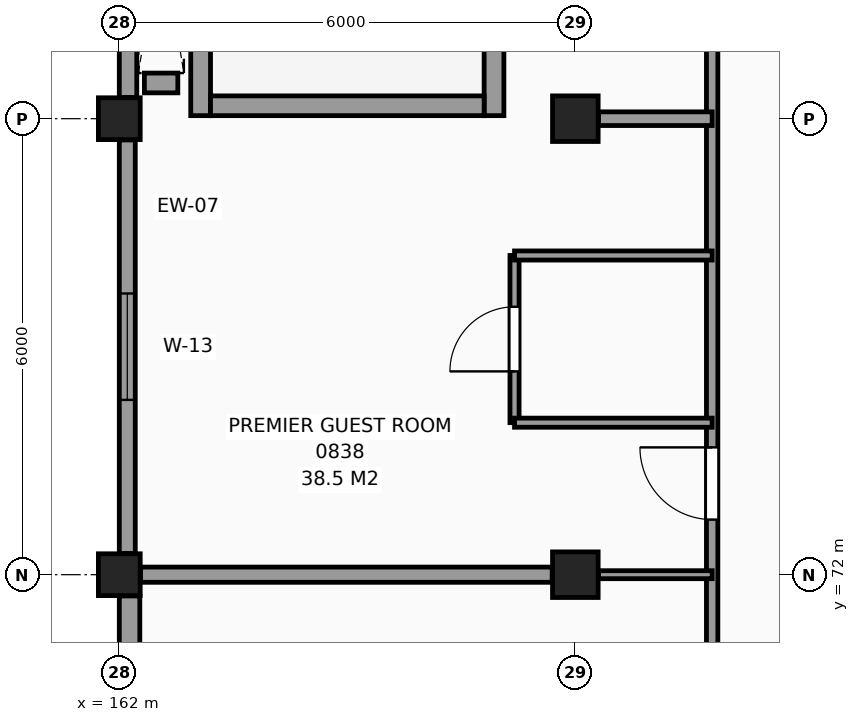
"""IFC4 building model, lengths in metres.
Left out: names, types, materials, properties, quantities, classifications, styles, units other than length and angle.
Written with IfcOpenShell. Run it as: python <this file> out.ifc"""

import sys

from ifc_helpers import new_model, si_unit, direction, frame, frame_2d, origin, origin_2d, place, context, subcontext, project, spatial, rectangle, extrude, element, fill, save


model = new_model("IFC4")
c1 = context("Model", 3, precision=1e-05, world=origin(), true_north=direction((0.0, 1.0)))
c2 = subcontext(c1, "Body", "Model", "MODEL_VIEW")
j1 = project(units=[si_unit("LENGTHUNIT", "METRE"), si_unit("PLANEANGLEUNIT", "RADIAN")], contexts=[c1])
p1 = place(None, origin())
s1 = spatial("IfcSite", under=j1, at=p1, CompositionType="ELEMENT")
p2 = place(p1, origin())
s2 = spatial("IfcBuilding", under=s1, at=p2, CompositionType="ELEMENT")
p3 = place(p2, frame((0.0, 0.0, 34.8)))
s3 = spatial("IfcBuildingStorey", under=s2, at=p3, CompositionType="ELEMENT", Elevation=34.8)
for number, where, z_axis, x_axis in (
    (1, (162.0, 72.0, 0.0), (0.0, 0.0, 1.0), (1.0, 0.0, 0.0)),
    (2, (162.0, 78.0, 0.0), (0.0, 0.0, 1.0), (1.0, 0.0, 0.0)),
):
    element("IfcColumn", number, at=place(p3, frame(where, z_axis=z_axis, x_axis=x_axis)), inside=s3, PredefinedType="COLUMN", context=c2, shape_type="SweptSolid", body=[
        extrude(rectangle(XDim=0.55, YDim=0.55, at=origin_2d()), origin(), (0.0, 0.0, 1.0), 3.3),
    ])
for number, where, z_axis, x_axis in (
    (3, (168.0, 72.0, 0.0), (0.0, 0.0, 1.0), (1.0, 0.0, 0.0)),
    (4, (168.0, 78.0, 0.0), (0.0, 0.0, 1.0), (1.0, 0.0, 0.0)),
):
    element("IfcColumn", number, at=place(p3, frame(where, z_axis=z_axis, x_axis=x_axis)), inside=s3, PredefinedType="COLUMN", context=c2, shape_type="SweptSolid", body=[
        extrude(rectangle(XDim=0.6, YDim=0.6, at=origin_2d()), origin(), (0.0, 0.0, 1.0), 3.3),
    ])
p4 = place(p3, frame((162.115, 83.72, 0.0), z_axis=(0.0, 0.0, 1.0), x_axis=(0.0, -1.0, 0.0)))
e5 = element("IfcWall", 5, at=p4, inside=s3, PredefinedType="SOLIDWALL", context=c2, shape_type="SweptSolid", body=[
    extrude(rectangle(XDim=5.44, YDim=0.23, at=frame_2d((2.72, 0.0))), origin(), (0.0, 0.0, 1.0), 3.07),
])
p5 = place(p3, frame((162.105, 77.72, 0.0), z_axis=(0.0, 0.0, 1.0), x_axis=(0.0, -1.0, 0.0)))
e6 = element("IfcWall", 6, at=p5, inside=s3, PredefinedType="SOLIDWALL", context=c2, shape_type="SweptSolid", body=[
    extrude(rectangle(XDim=5.44, YDim=0.21, at=frame_2d((2.72, 0.0))), origin(), (0.0, 0.0, 1.0), 2.42),
])
p6 = place(p5, frame((2.02, 0.0, 0.8)))
e7 = element("IfcOpeningElement", 7, at=p6, cuts=e6, PredefinedType="OPENING", context=c2, shape_type="SweptSolid", body=[
    extrude(rectangle(XDim=1.4, YDim=1.4, at=frame_2d((0.7, 0.7))), frame((0.0, 0.115, 0.0), z_axis=(0.0, -1.0, 0.0), x_axis=(1.0, 0.0, 0.0)), (0.0, 0.0, 1.0), 0.23),
])
p7 = place(p3, frame((162.135, 71.72, 0.0), z_axis=(0.0, 0.0, 1.0), x_axis=(0.0, -1.0, 0.0)))
e8 = element("IfcWall", 8, at=p7, inside=s3, PredefinedType="SOLIDWALL", context=c2, shape_type="SweptSolid", body=[
    extrude(rectangle(XDim=5.44, YDim=0.27, at=frame_2d((2.72, 0.0))), origin(), (0.0, 0.0, 1.0), 2.42),
])
p8 = place(p7, frame((2.02, 0.0, 0.8)))
e9 = element("IfcOpeningElement", 9, at=p8, cuts=e8, PredefinedType="OPENING", context=c2, shape_type="SweptSolid", body=[
    extrude(rectangle(XDim=1.4, YDim=1.4, at=frame_2d((0.7, 0.7))), frame((0.0, 0.145, 0.0), z_axis=(0.0, -1.0, 0.0), x_axis=(1.0, 0.0, 0.0)), (0.0, 0.0, 1.0), 0.29),
])
for number, where, z_axis, x_axis in (
    (10, (163.07, 78.04, 0.0), (0.0, 0.0, 1.0), (0.0, 1.0, 0.0)),
    (11, (166.93, 78.04, 0.0), (0.0, 0.0, 1.0), (0.0, 1.0, 0.0)),
):
    element("IfcWall", number, at=place(p3, frame(where, z_axis=z_axis, x_axis=x_axis)), inside=s3, PredefinedType="SHEAR", context=c2, shape_type="SweptSolid", body=[
        extrude(rectangle(XDim=10.72, YDim=0.26, at=frame_2d((5.36, 0.0))), origin(), (0.0, 0.0, 1.0), 3.3),
    ])
p9 = place(p3, frame((163.2, 78.17, 0.0), z_axis=(0.0, 0.0, 1.0), x_axis=(1.0, 0.0, 0.0)))
e12 = element("IfcWall", 12, at=p9, inside=s3, PredefinedType="SHEAR", context=c2, shape_type="SweptSolid", body=[
    extrude(rectangle(XDim=3.6, YDim=0.26, at=frame_2d((1.8, 0.0))), origin(), (0.0, 0.0, 1.0), 3.3),
])
p10 = place(p3, frame((162.33, 78.47, 0.0), z_axis=(0.0, 0.0, 1.0), x_axis=(1.0, 0.0, 0.0)))
e13 = element("IfcWall", 13, at=p10, inside=s3, PredefinedType="SHEAR", context=c2, shape_type="SweptSolid", body=[
    extrude(rectangle(XDim=0.44, YDim=0.26, at=frame_2d((0.22, 0.0))), origin(), (0.0, 0.0, 1.0), 3.3),
])
p11 = place(p3, frame((167.2, 74.0, 0.0), z_axis=(0.0, 0.0, 1.0), x_axis=(0.0, 1.0, 0.0)))
e14 = element("IfcWall", 14, at=p11, inside=s3, PredefinedType="PARTITIONING", context=c2, shape_type="SweptSolid", body=[
    extrude(rectangle(XDim=2.2, YDim=0.12, at=frame_2d((1.1, 0.0))), origin(), (0.0, 0.0, 1.0), 3.07),
])
p12 = place(p11, frame((0.675, 0.0, 0.0)))
e15 = element("IfcOpeningElement", 15, at=p12, cuts=e14, PredefinedType="OPENING", context=c2, shape_type="SweptSolid", body=[
    extrude(rectangle(XDim=0.85, YDim=2.1, at=frame_2d((0.425, 1.05))), frame((0.0, 0.07, 0.0), z_axis=(0.0, -1.0, 0.0), x_axis=(1.0, 0.0, 0.0)), (0.0, 0.0, 1.0), 0.14),
])
p13 = place(p3, frame((169.8, 42.235, 0.0), z_axis=(0.0, 0.0, 1.0), x_axis=(0.0, 1.0, 0.0)))
e16 = element("IfcWall", 16, at=p13, inside=s3, PredefinedType="PARTITIONING", context=c2, shape_type="SweptSolid", body=[
    extrude(rectangle(XDim=65.585, YDim=0.15, at=frame_2d((32.792, 0.0))), origin(), (0.0, 0.0, 1.0), 3.07),
])
p14 = place(p13, frame((50.165, 0.0, 0.0)))
e17 = element("IfcOpeningElement", 17, at=p14, cuts=e16, PredefinedType="OPENING", context=c2, shape_type="SweptSolid", body=[
    extrude(rectangle(XDim=1.2, YDim=2.2, at=frame_2d((0.6, 1.1))), frame((0.0, 0.085, 0.0), z_axis=(0.0, -1.0, 0.0), x_axis=(1.0, 0.0, 0.0)), (0.0, 0.0, 1.0), 0.17),
])
p15 = place(p13, frame((0.44, 0.0, 0.0)))
e18 = element("IfcOpeningElement", 18, at=p15, cuts=e16, PredefinedType="OPENING", context=c2, shape_type="SweptSolid", body=[
    extrude(rectangle(XDim=0.95, YDim=2.1, at=frame_2d((0.475, 1.05))), frame((0.0, 0.085, 0.0), z_axis=(0.0, -1.0, 0.0), x_axis=(1.0, 0.0, 0.0)), (0.0, 0.0, 1.0), 0.17),
])
p16 = place(p13, frame((6.49, 0.0, 0.0)))
e19 = element("IfcOpeningElement", 19, at=p16, cuts=e16, PredefinedType="OPENING", context=c2, shape_type="SweptSolid", body=[
    extrude(rectangle(XDim=0.95, YDim=2.1, at=frame_2d((0.475, 1.05))), frame((0.0, 0.085, 0.0), z_axis=(0.0, -1.0, 0.0), x_axis=(1.0, 0.0, 0.0)), (0.0, 0.0, 1.0), 0.17),
])
p17 = place(p13, frame((12.49, 0.0, 0.0)))
e20 = element("IfcOpeningElement", 20, at=p17, cuts=e16, PredefinedType="OPENING", context=c2, shape_type="SweptSolid", body=[
    extrude(rectangle(XDim=0.95, YDim=2.1, at=frame_2d((0.475, 1.05))), frame((0.0, 0.085, 0.0), z_axis=(0.0, -1.0, 0.0), x_axis=(1.0, 0.0, 0.0)), (0.0, 0.0, 1.0), 0.17),
])
p18 = place(p13, frame((18.49, 0.0, 0.0)))
e21 = element("IfcOpeningElement", 21, at=p18, cuts=e16, PredefinedType="OPENING", context=c2, shape_type="SweptSolid", body=[
    extrude(rectangle(XDim=0.95, YDim=2.1, at=frame_2d((0.475, 1.05))), frame((0.0, 0.085, 0.0), z_axis=(0.0, -1.0, 0.0), x_axis=(1.0, 0.0, 0.0)), (0.0, 0.0, 1.0), 0.17),
])
p19 = place(p13, frame((24.49, 0.0, 0.0)))
e22 = element("IfcOpeningElement", 22, at=p19, cuts=e16, PredefinedType="OPENING", context=c2, shape_type="SweptSolid", body=[
    extrude(rectangle(XDim=0.95, YDim=2.1, at=frame_2d((0.475, 1.05))), frame((0.0, 0.085, 0.0), z_axis=(0.0, -1.0, 0.0), x_axis=(1.0, 0.0, 0.0)), (0.0, 0.0, 1.0), 0.17),
])
p20 = place(p13, frame((30.49, 0.0, 0.0)))
e23 = element("IfcOpeningElement", 23, at=p20, cuts=e16, PredefinedType="OPENING", context=c2, shape_type="SweptSolid", body=[
    extrude(rectangle(XDim=0.95, YDim=2.1, at=frame_2d((0.475, 1.05))), frame((0.0, 0.085, 0.0), z_axis=(0.0, -1.0, 0.0), x_axis=(1.0, 0.0, 0.0)), (0.0, 0.0, 1.0), 0.17),
])
p21 = place(p13, frame((54.49, 0.0, 0.0)))
e24 = element("IfcOpeningElement", 24, at=p21, cuts=e16, PredefinedType="OPENING", context=c2, shape_type="SweptSolid", body=[
    extrude(rectangle(XDim=0.95, YDim=2.1, at=frame_2d((0.475, 1.05))), frame((0.0, 0.085, 0.0), z_axis=(0.0, -1.0, 0.0), x_axis=(1.0, 0.0, 0.0)), (0.0, 0.0, 1.0), 0.17),
])
p22 = place(p13, frame((60.49, 0.0, 0.0)))
e25 = element("IfcOpeningElement", 25, at=p22, cuts=e16, PredefinedType="OPENING", context=c2, shape_type="SweptSolid", body=[
    extrude(rectangle(XDim=0.95, YDim=2.1, at=frame_2d((0.475, 1.05))), frame((0.0, 0.085, 0.0), z_axis=(0.0, -1.0, 0.0), x_axis=(1.0, 0.0, 0.0)), (0.0, 0.0, 1.0), 0.17),
])
p23 = place(p3, frame((162.28, 72.0, 0.0), z_axis=(0.0, 0.0, 1.0), x_axis=(1.0, 0.0, 0.0)))
e26 = element("IfcWall", 26, at=p23, inside=s3, PredefinedType="PARTITIONING", context=c2, shape_type="SweptSolid", body=[
    extrude(rectangle(XDim=5.415, YDim=0.2, at=frame_2d((2.708, 0.0))), origin(), (0.0, 0.0, 1.0), 2.27),
])
p24 = place(p3, frame((168.305, 72.0, 0.0), z_axis=(0.0, 0.0, 1.0), x_axis=(1.0, 0.0, 0.0)))
e27 = element("IfcWall", 27, at=p24, inside=s3, PredefinedType="PARTITIONING", context=c2, shape_type="SweptSolid", body=[
    extrude(rectangle(XDim=1.495, YDim=0.105, at=frame_2d((0.748, 0.0))), origin(), (0.0, 0.0, 1.0), 2.27),
])
for number, where, z_axis, x_axis in (
    (28, (167.2, 74.0, 0.0), (0.0, 0.0, 1.0), (1.0, 0.0, 0.0)),
    (29, (167.2, 76.2, 0.0), (0.0, 0.0, 1.0), (1.0, 0.0, 0.0)),
):
    element("IfcWall", number, at=place(p3, frame(where, z_axis=z_axis, x_axis=x_axis)), inside=s3, PredefinedType="PARTITIONING", context=c2, shape_type="SweptSolid", body=[
        extrude(rectangle(XDim=2.6, YDim=0.12, at=frame_2d((1.3, 0.0))), origin(), (0.0, 0.0, 1.0), 3.07),
    ])
p25 = place(p3, frame((168.305, 78.0, 0.0), z_axis=(0.0, 0.0, 1.0), x_axis=(1.0, 0.0, 0.0)))
e30 = element("IfcWall", 30, at=p25, inside=s3, PredefinedType="PARTITIONING", context=c2, shape_type="SweptSolid", body=[
    extrude(rectangle(XDim=1.495, YDim=0.18, at=frame_2d((0.748, 0.0))), origin(), (0.0, 0.0, 1.0), 2.27),
])
p26 = place(p6, origin())
e31 = element("IfcWindow", 31, at=p26, inside=s3, PartitioningType="SINGLE_PANEL", PredefinedType="WINDOW", context=c2, shape_type="SweptSolid", body=[
    extrude(rectangle(XDim=1.4, YDim=1.4, at=frame_2d((0.7, 0.7))), frame((0.0, 0.03, 0.0), z_axis=(0.0, -1.0, 0.0), x_axis=(1.0, 0.0, 0.0)), (0.0, 0.0, 1.0), 0.06),
])
fill(e7, e31)
p27 = place(p12, origin())
e32 = element("IfcDoor", 32, at=p27, inside=s3, OperationType="SINGLE_SWING_LEFT", PredefinedType="DOOR", context=c2, shape_type="SweptSolid", body=[
    extrude(rectangle(XDim=0.85, YDim=2.1, at=frame_2d((0.425, 1.05))), frame((0.0, 0.025, 0.0), z_axis=(0.0, -1.0, 0.0), x_axis=(1.0, 0.0, 0.0)), (0.0, 0.0, 1.0), 0.05),
])
fill(e15, e32)
p28 = place(p20, origin())
e33 = element("IfcDoor", 33, at=p28, inside=s3, OperationType="SINGLE_SWING_RIGHT", PredefinedType="DOOR", context=c2, shape_type="SweptSolid", body=[
    extrude(rectangle(XDim=0.95, YDim=2.1, at=frame_2d((0.475, 1.05))), frame((0.0, 0.025, 0.0), z_axis=(0.0, -1.0, 0.0), x_axis=(1.0, 0.0, 0.0)), (0.0, 0.0, 1.0), 0.05),
])
fill(e23, e33)
save(model, sys.argv[1])
